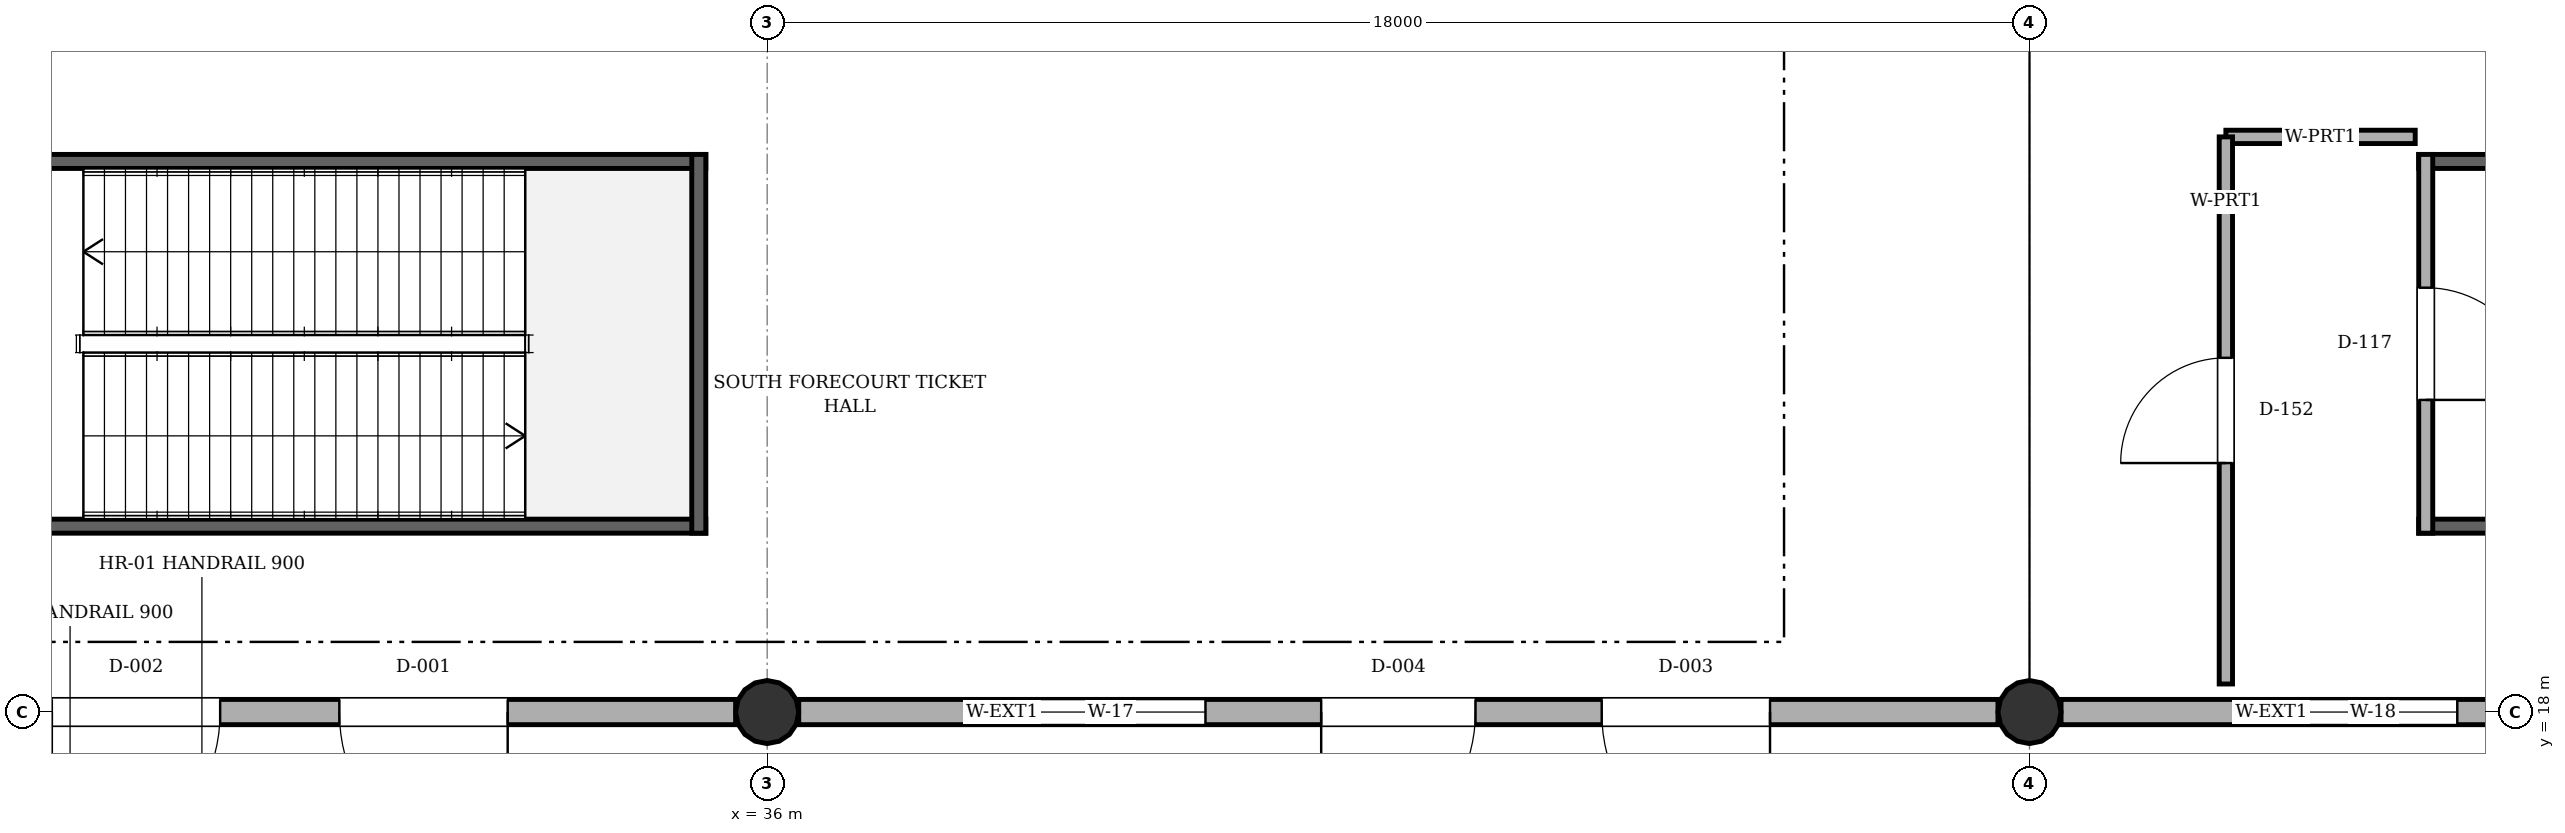
"""IFC4 building model, lengths in metres.
Left out: names, types, materials, properties, quantities, classifications, styles, units other than length and angle.
Written with IfcOpenShell. Run it as: python <this file> out.ifc"""

import sys

from ifc_helpers import new_model, si_unit, direction, frame, frame_2d, origin, origin_2d, place, context, subcontext, project, spatial, rectangle, circle, extrude, element, fill, save


model = new_model("IFC4")
c1 = context("Model", 3, precision=1e-05, world=origin(), true_north=direction((0.0, 1.0)))
c2 = subcontext(c1, "Body", "Model", "MODEL_VIEW")
j1 = project(units=[si_unit("LENGTHUNIT", "METRE"), si_unit("PLANEANGLEUNIT", "RADIAN")], contexts=[c1])
p1 = place(None, origin())
s1 = spatial("IfcSite", under=j1, at=p1, CompositionType="ELEMENT")
p2 = place(p1, origin())
s2 = spatial("IfcBuilding", under=s1, at=p2, CompositionType="ELEMENT")
p3 = place(p2, origin())
s3 = spatial("IfcBuildingStorey", under=s2, at=p3, CompositionType="ELEMENT", Elevation=0.0)
for number, where, z_axis, x_axis in (
    (1, (36.0, 18.0, 0.0), (0.0, 0.0, 1.0), (1.0, 0.0, 0.0)),
    (2, (54.0, 18.0, 0.0), (0.0, 0.0, 1.0), (1.0, 0.0, 0.0)),
):
    element("IfcColumn", number, at=place(p3, frame(where, z_axis=z_axis, x_axis=x_axis)), inside=s3, PredefinedType="COLUMN", context=c2, shape_type="SweptSolid", body=[
        extrude(circle(Radius=0.45, at=origin_2d()), origin(), (0.0, 0.0, 1.0), 6.6),
    ])
p4 = place(p3, frame((35.55, 18.0, 0.0), z_axis=(0.0, 0.0, 1.0), x_axis=(-1.0, 0.0, 0.0)))
e3 = element("IfcWall", 3, at=p4, inside=s3, PredefinedType="SOLIDWALL", context=c2, shape_type="SweptSolid", body=[
    extrude(rectangle(XDim=17.1, YDim=0.36, at=frame_2d((8.55, 0.0))), origin(), (0.0, 0.0, 1.0), 5.595),
])
p5 = place(p4, frame((3.25, 0.0, 0.0)))
e4 = element("IfcOpeningElement", 4, at=p5, cuts=e3, PredefinedType="OPENING", context=c2, shape_type="SweptSolid", body=[
    extrude(rectangle(XDim=2.4, YDim=2.5, at=frame_2d((1.2, 1.25))), frame((0.0, 0.19, 0.0), z_axis=(0.0, -1.0, 0.0), x_axis=(1.0, 0.0, 0.0)), (0.0, 0.0, 1.0), 0.38),
])
p6 = place(p4, frame((7.35, 0.0, 0.0)))
e5 = element("IfcOpeningElement", 5, at=p6, cuts=e3, PredefinedType="OPENING", context=c2, shape_type="SweptSolid", body=[
    extrude(rectangle(XDim=2.4, YDim=2.5, at=frame_2d((1.2, 1.25))), frame((0.0, 0.19, 0.0), z_axis=(0.0, -1.0, 0.0), x_axis=(1.0, 0.0, 0.0)), (0.0, 0.0, 1.0), 0.38),
])
p7 = place(p4, frame((11.15, 0.0, 0.95)))
e6 = element("IfcOpeningElement", 6, at=p7, cuts=e3, PredefinedType="OPENING", context=c2, shape_type="SweptSolid", body=[
    extrude(rectangle(XDim=3.0, YDim=2.1, at=frame_2d((1.5, 1.05))), frame((0.0, 0.19, 0.0), z_axis=(0.0, -1.0, 0.0), x_axis=(1.0, 0.0, 0.0)), (0.0, 0.0, 1.0), 0.38),
])
p8 = place(p3, frame((53.55, 18.0, 0.0), z_axis=(0.0, 0.0, 1.0), x_axis=(-1.0, 0.0, 0.0)))
e7 = element("IfcWall", 7, at=p8, inside=s3, PredefinedType="SOLIDWALL", context=c2, shape_type="SweptSolid", body=[
    extrude(rectangle(XDim=17.1, YDim=0.36, at=frame_2d((8.55, 0.0))), origin(), (0.0, 0.0, 1.0), 5.595),
])
p9 = place(p8, frame((3.25, 0.0, 0.0)))
e8 = element("IfcOpeningElement", 8, at=p9, cuts=e7, PredefinedType="OPENING", context=c2, shape_type="SweptSolid", body=[
    extrude(rectangle(XDim=2.4, YDim=2.5, at=frame_2d((1.2, 1.25))), frame((0.0, 0.19, 0.0), z_axis=(0.0, -1.0, 0.0), x_axis=(1.0, 0.0, 0.0)), (0.0, 0.0, 1.0), 0.38),
])
p10 = place(p8, frame((7.45, 0.0, 0.0)))
e9 = element("IfcOpeningElement", 9, at=p10, cuts=e7, PredefinedType="OPENING", context=c2, shape_type="SweptSolid", body=[
    extrude(rectangle(XDim=2.2, YDim=2.45, at=frame_2d((1.1, 1.225))), frame((0.0, 0.19, 0.0), z_axis=(0.0, -1.0, 0.0), x_axis=(1.0, 0.0, 0.0)), (0.0, 0.0, 1.0), 0.38),
])
p11 = place(p8, frame((11.3, 0.0, 0.95)))
e10 = element("IfcOpeningElement", 10, at=p11, cuts=e7, PredefinedType="OPENING", context=c2, shape_type="SweptSolid", body=[
    extrude(rectangle(XDim=2.7, YDim=2.1, at=frame_2d((1.35, 1.05))), frame((0.0, 0.19, 0.0), z_axis=(0.0, -1.0, 0.0), x_axis=(1.0, 0.0, 0.0)), (0.0, 0.0, 1.0), 0.38),
])
p12 = place(p3, frame((71.55, 18.0, 0.0), z_axis=(0.0, 0.0, 1.0), x_axis=(-1.0, 0.0, 0.0)))
e11 = element("IfcWall", 11, at=p12, inside=s3, PredefinedType="SOLIDWALL", context=c2, shape_type="SweptSolid", body=[
    extrude(rectangle(XDim=17.1, YDim=0.36, at=frame_2d((8.55, 0.0))), origin(), (0.0, 0.0, 1.0), 5.595),
])
p13 = place(p12, frame((3.35, 0.0, 0.0)))
e12 = element("IfcOpeningElement", 12, at=p13, cuts=e11, PredefinedType="OPENING", context=c2, shape_type="SweptSolid", body=[
    extrude(rectangle(XDim=2.2, YDim=2.45, at=frame_2d((1.1, 1.225))), frame((0.0, 0.19, 0.0), z_axis=(0.0, -1.0, 0.0), x_axis=(1.0, 0.0, 0.0)), (0.0, 0.0, 1.0), 0.38),
])
p14 = place(p12, frame((7.55, 0.0, 0.0)))
e13 = element("IfcOpeningElement", 13, at=p14, cuts=e11, PredefinedType="OPENING", context=c2, shape_type="SweptSolid", body=[
    extrude(rectangle(XDim=2.0, YDim=2.4, at=frame_2d((1.0, 1.2))), frame((0.0, 0.19, 0.0), z_axis=(0.0, -1.0, 0.0), x_axis=(1.0, 0.0, 0.0)), (0.0, 0.0, 1.0), 0.38),
])
p15 = place(p12, frame((11.45, 0.0, 0.95)))
e14 = element("IfcOpeningElement", 14, at=p15, cuts=e11, PredefinedType="OPENING", context=c2, shape_type="SweptSolid", body=[
    extrude(rectangle(XDim=2.4, YDim=2.1, at=frame_2d((1.2, 1.05))), frame((0.0, 0.19, 0.0), z_axis=(0.0, -1.0, 0.0), x_axis=(1.0, 0.0, 0.0)), (0.0, 0.0, 1.0), 0.38),
])
for number, where, z_axis, x_axis in (
    (15, (23.55, 20.65, 0.0), (0.0, 0.0, 1.0), (1.0, 0.0, 0.0)),
    (16, (35.125, 25.85, 0.0), (0.0, 0.0, 1.0), (-1.0, 0.0, 0.0)),
):
    element("IfcWall", number, at=place(p3, frame(where, z_axis=z_axis, x_axis=x_axis)), inside=s3, PredefinedType="SOLIDWALL", context=c2, shape_type="SweptSolid", body=[
        extrude(rectangle(XDim=11.575, YDim=0.2, at=frame_2d((5.788, 0.0))), origin(), (0.0, 0.0, 1.0), 6.32),
    ])
p16 = place(p3, frame((35.025, 20.55, 0.0), z_axis=(0.0, 0.0, 1.0), x_axis=(0.0, 1.0, 0.0)))
e17 = element("IfcWall", 17, at=p16, inside=s3, PredefinedType="SOLIDWALL", context=c2, shape_type="SweptSolid", body=[
    extrude(rectangle(XDim=5.4, YDim=0.2, at=frame_2d((2.7, 0.0))), origin(), (0.0, 0.0, 1.0), 6.32),
])
for number, where, z_axis, x_axis in (
    (18, (59.55, 20.65, 0.0), (0.0, 0.0, 1.0), (1.0, 0.0, 0.0)),
    (19, (71.125, 25.85, 0.0), (0.0, 0.0, 1.0), (-1.0, 0.0, 0.0)),
):
    element("IfcWall", number, at=place(p3, frame(where, z_axis=z_axis, x_axis=x_axis)), inside=s3, PredefinedType="SOLIDWALL", context=c2, shape_type="SweptSolid", body=[
        extrude(rectangle(XDim=11.575, YDim=0.2, at=frame_2d((5.788, 0.0))), origin(), (0.0, 0.0, 1.0), 6.32),
    ])
p17 = place(p3, frame((59.65, 25.95, 0.0), z_axis=(0.0, 0.0, 1.0), x_axis=(0.0, -1.0, 0.0)))
e20 = element("IfcWall", 20, at=p17, inside=s3, PredefinedType="SOLIDWALL", context=c2, shape_type="SweptSolid", body=[
    extrude(rectangle(XDim=5.4, YDim=0.2, at=frame_2d((2.7, 0.0))), origin(), (0.0, 0.0, 1.0), 4.4),
])
p18 = place(p17, frame((1.9, 0.0, 0.0)))
e21 = element("IfcOpeningElement", 21, at=p18, cuts=e20, PredefinedType="OPENING", context=c2, shape_type="SweptSolid", body=[
    extrude(rectangle(XDim=1.6, YDim=2.15, at=frame_2d((0.8, 1.075))), frame((0.0, 0.11, 0.0), z_axis=(0.0, -1.0, 0.0), x_axis=(1.0, 0.0, 0.0)), (0.0, 0.0, 1.0), 0.22),
])
p19 = place(p3, frame((56.8, 26.2, 0.0), z_axis=(0.0, 0.0, 1.0), x_axis=(1.0, 0.0, 0.0)))
e22 = element("IfcWall", 22, at=p19, inside=s3, PredefinedType="PARTITIONING", context=c2, shape_type="SweptSolid", body=[
    extrude(rectangle(XDim=2.7, YDim=0.19, at=frame_2d((1.35, 0.0))), origin(), (0.0, 0.0, 1.0), 4.4),
])
p20 = place(p3, frame((56.8, 18.4, 0.0), z_axis=(0.0, 0.0, 1.0), x_axis=(0.0, 1.0, 0.0)))
e23 = element("IfcWall", 23, at=p20, inside=s3, PredefinedType="PARTITIONING", context=c2, shape_type="SweptSolid", body=[
    extrude(rectangle(XDim=7.8, YDim=0.19, at=frame_2d((3.9, 0.0))), origin(), (0.0, 0.0, 1.0), 4.4),
])
p21 = place(p20, frame((3.15, 0.0, 0.0)))
e24 = element("IfcOpeningElement", 24, at=p21, cuts=e23, PredefinedType="OPENING", context=c2, shape_type="SweptSolid", body=[
    extrude(rectangle(XDim=1.5, YDim=2.15, at=frame_2d((0.75, 1.075))), frame((0.0, 0.105, 0.0), z_axis=(0.0, -1.0, 0.0), x_axis=(1.0, 0.0, 0.0)), (0.0, 0.0, 1.0), 0.21),
])
p22 = place(p5, origin())
e25 = element("IfcDoor", 25, at=p22, inside=s3, OperationType="SINGLE_SWING_LEFT", PredefinedType="DOOR", context=c2, shape_type="SweptSolid", body=[
    extrude(rectangle(XDim=2.4, YDim=2.5, at=frame_2d((1.2, 1.25))), frame((0.0, 0.025, 0.0), z_axis=(0.0, -1.0, 0.0), x_axis=(1.0, 0.0, 0.0)), (0.0, 0.0, 1.0), 0.05),
])
fill(e4, e25)
p23 = place(p6, origin())
e26 = element("IfcDoor", 26, at=p23, inside=s3, OperationType="SINGLE_SWING_RIGHT", PredefinedType="DOOR", context=c2, shape_type="SweptSolid", body=[
    extrude(rectangle(XDim=2.4, YDim=2.5, at=frame_2d((1.2, 1.25))), frame((0.0, 0.025, 0.0), z_axis=(0.0, -1.0, 0.0), x_axis=(1.0, 0.0, 0.0)), (0.0, 0.0, 1.0), 0.05),
])
fill(e5, e26)
p24 = place(p9, origin())
e27 = element("IfcDoor", 27, at=p24, inside=s3, OperationType="SINGLE_SWING_LEFT", PredefinedType="DOOR", context=c2, shape_type="SweptSolid", body=[
    extrude(rectangle(XDim=2.4, YDim=2.5, at=frame_2d((1.2, 1.25))), frame((0.0, 0.025, 0.0), z_axis=(0.0, -1.0, 0.0), x_axis=(1.0, 0.0, 0.0)), (0.0, 0.0, 1.0), 0.05),
])
fill(e8, e27)
p25 = place(p10, origin())
e28 = element("IfcDoor", 28, at=p25, inside=s3, OperationType="SINGLE_SWING_RIGHT", PredefinedType="DOOR", context=c2, shape_type="SweptSolid", body=[
    extrude(rectangle(XDim=2.2, YDim=2.45, at=frame_2d((1.1, 1.225))), frame((0.0, 0.025, 0.0), z_axis=(0.0, -1.0, 0.0), x_axis=(1.0, 0.0, 0.0)), (0.0, 0.0, 1.0), 0.05),
])
fill(e9, e28)
p26 = place(p11, origin())
e29 = element("IfcWindow", 29, at=p26, inside=s3, PartitioningType="SINGLE_PANEL", PredefinedType="WINDOW", context=c2, shape_type="SweptSolid", body=[
    extrude(rectangle(XDim=2.7, YDim=2.1, at=frame_2d((1.35, 1.05))), frame((0.0, 0.03, 0.0), z_axis=(0.0, -1.0, 0.0), x_axis=(1.0, 0.0, 0.0)), (0.0, 0.0, 1.0), 0.06),
])
fill(e10, e29)
p27 = place(p15, origin())
e30 = element("IfcWindow", 30, at=p27, inside=s3, PartitioningType="SINGLE_PANEL", PredefinedType="WINDOW", context=c2, shape_type="SweptSolid", body=[
    extrude(rectangle(XDim=2.4, YDim=2.1, at=frame_2d((1.2, 1.05))), frame((0.0, 0.03, 0.0), z_axis=(0.0, -1.0, 0.0), x_axis=(1.0, 0.0, 0.0)), (0.0, 0.0, 1.0), 0.06),
])
fill(e14, e30)
p28 = place(p18, origin())
e31 = element("IfcDoor", 31, at=p28, inside=s3, OperationType="SINGLE_SWING_RIGHT", PredefinedType="DOOR", context=c2, shape_type="SweptSolid", body=[
    extrude(rectangle(XDim=1.6, YDim=2.15, at=frame_2d((0.8, 1.075))), frame((0.0, 0.025, 0.0), z_axis=(0.0, -1.0, 0.0), x_axis=(1.0, 0.0, 0.0)), (0.0, 0.0, 1.0), 0.05),
])
fill(e21, e31)
p29 = place(p21, origin())
e32 = element("IfcDoor", 32, at=p29, inside=s3, OperationType="SINGLE_SWING_LEFT", PredefinedType="DOOR", context=c2, shape_type="SweptSolid", body=[
    extrude(rectangle(XDim=1.5, YDim=2.15, at=frame_2d((0.75, 1.075))), frame((0.0, 0.025, 0.0), z_axis=(0.0, -1.0, 0.0), x_axis=(1.0, 0.0, 0.0)), (0.0, 0.0, 1.0), 0.05),
])
fill(e24, e32)
save(model, sys.argv[1])
